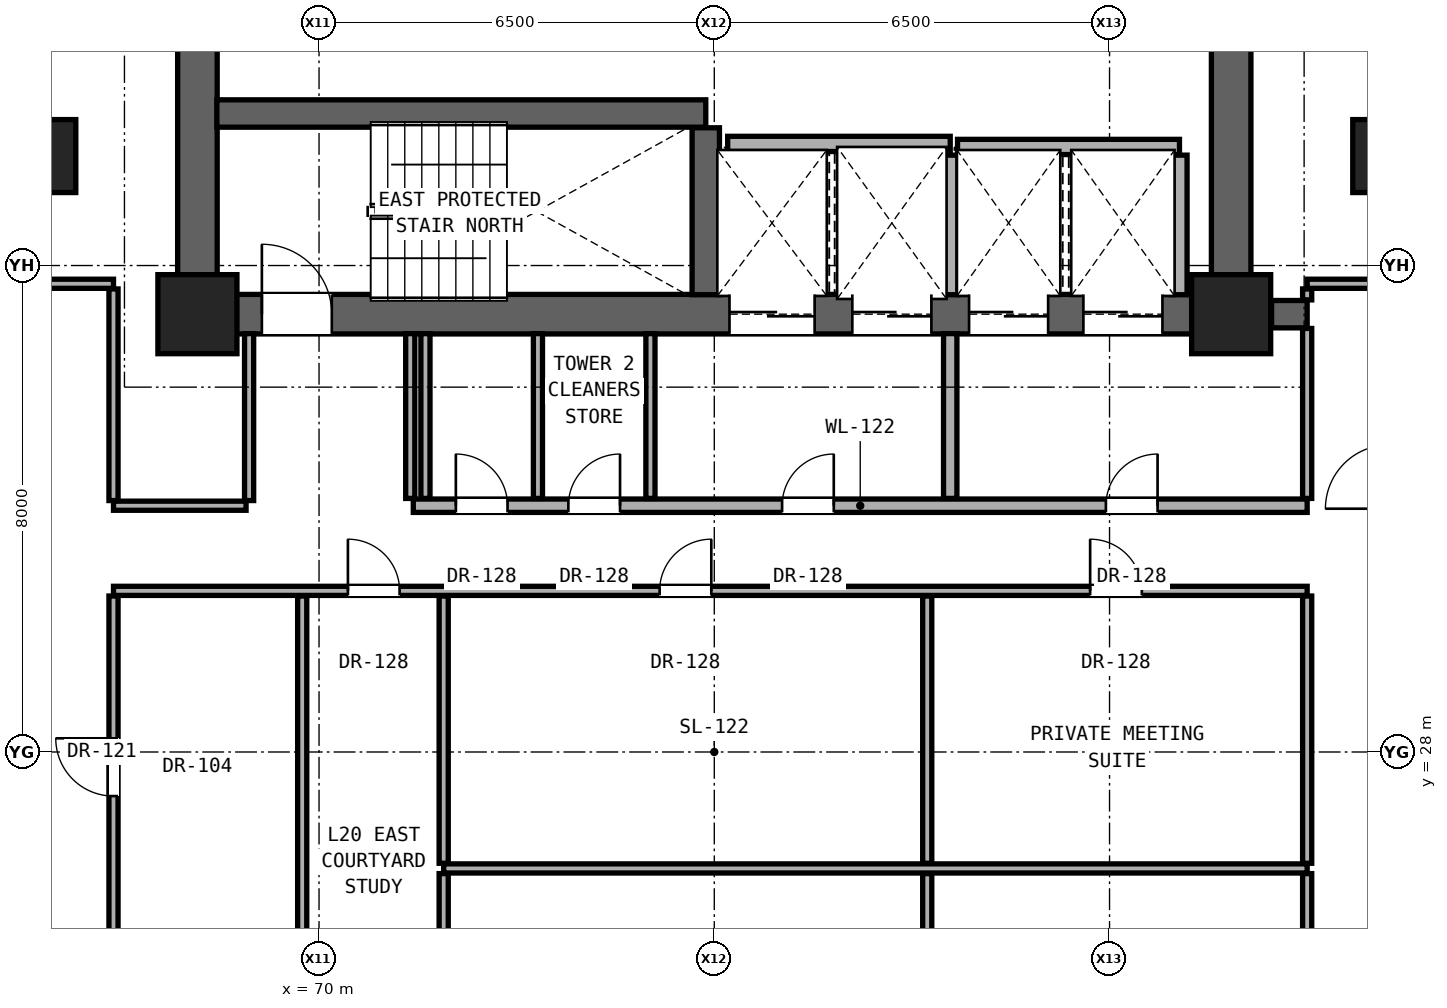
"""IFC4 building model, lengths in metres.
Left out: names, types, materials, properties, quantities, classifications, styles, units other than length and angle.
Written with IfcOpenShell. Run it as: python <this file> out.ifc"""

import sys

from ifc_helpers import new_model, si_unit, direction, frame, frame_2d, origin, origin_2d, place, context, subcontext, project, spatial, rectangle, extrude, element, fill, save


model = new_model("IFC4")
c1 = context("Model", 3, precision=1e-05, world=origin(), true_north=direction((0.0, 1.0)))
c2 = subcontext(c1, "Body", "Model", "MODEL_VIEW")
j1 = project(units=[si_unit("LENGTHUNIT", "METRE"), si_unit("PLANEANGLEUNIT", "RADIAN")], contexts=[c1])
p1 = place(None, origin())
s1 = spatial("IfcSite", under=j1, at=p1, CompositionType="ELEMENT")
p2 = place(p1, origin())
s2 = spatial("IfcBuilding", under=s1, at=p2, CompositionType="ELEMENT")
p3 = place(p2, frame((0.0, 0.0, 71.9)))
s3 = spatial("IfcBuildingStorey", under=s2, at=p3, CompositionType="ELEMENT", Elevation=71.9)
for number, where, z_axis, x_axis in (
    (1, (68.0, 35.2, 0.0), (0.0, 0.0, 1.0), (1.0, 0.0, 0.0)),
    (2, (85.0, 35.2, 0.0), (0.0, 0.0, 1.0), (1.0, 0.0, 0.0)),
):
    element("IfcColumn", number, at=place(p3, frame(where, z_axis=z_axis, x_axis=x_axis)), inside=s3, PredefinedType="COLUMN", context=c2, shape_type="SweptSolid", body=[
        extrude(rectangle(XDim=1.3, YDim=1.3, at=origin_2d()), origin(), (0.0, 0.0, 1.0), 3.3),
    ])
for number, where, z_axis, x_axis in (
    (3, (65.6, 37.8, 0.0), (0.0, 0.0, 1.0), (1.0, 0.0, 0.0)),
    (4, (87.4, 37.8, 0.0), (0.0, 0.0, 1.0), (1.0, 0.0, 0.0)),
):
    element("IfcColumn", number, at=place(p3, frame(where, z_axis=z_axis, x_axis=x_axis)), inside=s3, PredefinedType="PILASTER", context=c2, shape_type="SweptSolid", body=[
        extrude(rectangle(XDim=0.8, YDim=1.2, at=origin_2d()), origin(), (0.0, 0.0, 1.0), 3.3),
    ])
for number, where, z_axis, x_axis in (
    (5, (68.0, 35.2, 0.0), (0.0, 0.0, 1.0), (0.0, 1.0, 0.0)),
    (6, (85.0, 35.2, 0.0), (0.0, 0.0, 1.0), (0.0, 1.0, 0.0)),
):
    element("IfcWall", number, at=place(p3, frame(where, z_axis=z_axis, x_axis=x_axis)), inside=s3, PredefinedType="SHEAR", context=c2, shape_type="SweptSolid", body=[
        extrude(rectangle(XDim=5.6, YDim=0.65, at=frame_2d((2.8, 0.0))), origin(), (0.0, 0.0, 1.0), 3.06),
    ])
p4 = place(p3, frame((68.0, 35.2, 0.0), z_axis=(0.0, 0.0, 1.0), x_axis=(1.0, 0.0, 0.0)))
e7 = element("IfcWall", 7, at=p4, inside=s3, PredefinedType="SHEAR", context=c2, shape_type="SweptSolid", body=[
    extrude(rectangle(XDim=17.0, YDim=0.65, at=frame_2d((8.5, 0.0))), origin(), (0.0, 0.0, 1.0), 3.06),
])
p5 = place(p4, frame((1.06, 0.0, 0.0)))
e8 = element("IfcOpeningElement", 8, at=p5, cuts=e7, PredefinedType="OPENING", context=c2, shape_type="SweptSolid", body=[
    extrude(rectangle(XDim=1.15, YDim=2.2, at=frame_2d((0.575, 1.1))), frame((0.0, 0.335, 0.0), z_axis=(0.0, -1.0, 0.0), x_axis=(1.0, 0.0, 0.0)), (0.0, 0.0, 1.0), 0.67),
])
p6 = place(p4, frame((8.75, 0.0, 0.0)))
e9 = element("IfcOpeningElement", 9, at=p6, cuts=e7, PredefinedType="OPENING", context=c2, shape_type="SweptSolid", body=[
    extrude(rectangle(XDim=1.4, YDim=2.35, at=frame_2d((0.7, 1.175))), frame((0.0, 0.335, 0.0), z_axis=(0.0, -1.0, 0.0), x_axis=(1.0, 0.0, 0.0)), (0.0, 0.0, 1.0), 0.67),
])
p7 = place(p4, frame((10.77, 0.0, 0.0)))
e10 = element("IfcOpeningElement", 10, at=p7, cuts=e7, PredefinedType="OPENING", context=c2, shape_type="SweptSolid", body=[
    extrude(rectangle(XDim=1.3, YDim=2.3, at=frame_2d((0.65, 1.15))), frame((0.0, 0.335, 0.0), z_axis=(0.0, -1.0, 0.0), x_axis=(1.0, 0.0, 0.0)), (0.0, 0.0, 1.0), 0.67),
])
p8 = place(p4, frame((12.69, 0.0, 0.0)))
e11 = element("IfcOpeningElement", 11, at=p8, cuts=e7, PredefinedType="OPENING", context=c2, shape_type="SweptSolid", body=[
    extrude(rectangle(XDim=1.3, YDim=2.3, at=frame_2d((0.65, 1.15))), frame((0.0, 0.335, 0.0), z_axis=(0.0, -1.0, 0.0), x_axis=(1.0, 0.0, 0.0)), (0.0, 0.0, 1.0), 0.67),
])
p9 = place(p4, frame((14.57, 0.0, 0.0)))
e12 = element("IfcOpeningElement", 12, at=p9, cuts=e7, PredefinedType="OPENING", context=c2, shape_type="SweptSolid", body=[
    extrude(rectangle(XDim=1.3, YDim=2.3, at=frame_2d((0.65, 1.15))), frame((0.0, 0.335, 0.0), z_axis=(0.0, -1.0, 0.0), x_axis=(1.0, 0.0, 0.0)), (0.0, 0.0, 1.0), 0.67),
])
p10 = place(p3, frame((72.05, 26.085, 0.0), z_axis=(0.0, 0.0, 1.0), x_axis=(1.0, 0.0, 0.0)))
e13 = element("IfcWall", 13, at=p10, inside=s3, PredefinedType="PARTITIONING", context=c2, shape_type="SweptSolid", body=[
    extrude(rectangle(XDim=14.2, YDim=0.15, at=frame_2d((7.1, 0.0))), origin(), (0.0, 0.0, 1.0), 2.125),
])
p11 = place(p3, frame((66.62, 30.65, 0.0), z_axis=(0.0, 0.0, 1.0), x_axis=(1.0, 0.0, 0.0)))
e14 = element("IfcWall", 14, at=p11, inside=s3, PredefinedType="PARTITIONING", context=c2, shape_type="SweptSolid", body=[
    extrude(rectangle(XDim=19.63, YDim=0.15, at=frame_2d((9.815, 0.0))), origin(), (0.0, 0.0, 1.0), 2.125),
])
p12 = place(p11, frame((3.855, 0.0, 0.0)))
e15 = element("IfcOpeningElement", 15, at=p12, cuts=e14, PredefinedType="OPENING", context=c2, shape_type="SweptSolid", body=[
    extrude(rectangle(XDim=0.85, YDim=2.01, at=frame_2d((0.425, 1.005))), frame((0.0, 0.085, 0.0), z_axis=(0.0, -1.0, 0.0), x_axis=(1.0, 0.0, 0.0)), (0.0, 0.0, 1.0), 0.17),
])
p13 = place(p11, frame((8.981, 0.0, 0.0)))
e16 = element("IfcOpeningElement", 16, at=p13, cuts=e14, PredefinedType="OPENING", context=c2, shape_type="SweptSolid", body=[
    extrude(rectangle(XDim=0.85, YDim=2.01, at=frame_2d((0.425, 1.005))), frame((0.0, 0.085, 0.0), z_axis=(0.0, -1.0, 0.0), x_axis=(1.0, 0.0, 0.0)), (0.0, 0.0, 1.0), 0.17),
])
p14 = place(p11, frame((16.061, 0.0, 0.0)))
e17 = element("IfcOpeningElement", 17, at=p14, cuts=e14, PredefinedType="OPENING", context=c2, shape_type="SweptSolid", body=[
    extrude(rectangle(XDim=0.85, YDim=2.01, at=frame_2d((0.425, 1.005))), frame((0.0, 0.085, 0.0), z_axis=(0.0, -1.0, 0.0), x_axis=(1.0, 0.0, 0.0)), (0.0, 0.0, 1.0), 0.17),
])
p15 = place(p3, frame((66.62, 32.05, 0.0), z_axis=(0.0, 0.0, 1.0), x_axis=(1.0, 0.0, 0.0)))
e18 = element("IfcWall", 18, at=p15, inside=s3, PredefinedType="PARTITIONING", context=c2, shape_type="SweptSolid", body=[
    extrude(rectangle(XDim=2.18, YDim=0.15, at=frame_2d((1.09, 0.0))), origin(), (0.0, 0.0, 1.0), 2.125),
])
p16 = place(p3, frame((71.55, 32.05, 0.0), z_axis=(0.0, 0.0, 1.0), x_axis=(1.0, 0.0, 0.0)))
e19 = element("IfcWall", 19, at=p16, inside=s3, PredefinedType="SOLIDWALL", context=c2, shape_type="SweptSolid", body=[
    extrude(rectangle(XDim=14.7, YDim=0.22, at=frame_2d((7.35, 0.0))), origin(), (0.0, 0.0, 1.0), 2.125),
])
p17 = place(p16, frame((11.39, 0.0, 0.0)))
e20 = element("IfcOpeningElement", 20, at=p17, cuts=e19, PredefinedType="OPENING", context=c2, shape_type="SweptSolid", body=[
    extrude(rectangle(XDim=0.85, YDim=2.01, at=frame_2d((0.425, 1.005))), frame((0.0, 0.12, 0.0), z_axis=(0.0, -1.0, 0.0), x_axis=(1.0, 0.0, 0.0)), (0.0, 0.0, 1.0), 0.24),
])
p18 = place(p16, frame((6.065, 0.0, 0.0)))
e21 = element("IfcOpeningElement", 21, at=p18, cuts=e19, PredefinedType="OPENING", context=c2, shape_type="SweptSolid", body=[
    extrude(rectangle(XDim=0.85, YDim=2.01, at=frame_2d((0.425, 1.005))), frame((0.0, 0.12, 0.0), z_axis=(0.0, -1.0, 0.0), x_axis=(1.0, 0.0, 0.0)), (0.0, 0.0, 1.0), 0.24),
])
p19 = place(p16, frame((0.7, 0.0, 0.0)))
e22 = element("IfcOpeningElement", 22, at=p19, cuts=e19, PredefinedType="OPENING", context=c2, shape_type="SweptSolid", body=[
    extrude(rectangle(XDim=0.85, YDim=2.01, at=frame_2d((0.425, 1.005))), frame((0.0, 0.12, 0.0), z_axis=(0.0, -1.0, 0.0), x_axis=(1.0, 0.0, 0.0)), (0.0, 0.0, 1.0), 0.24),
])
p20 = place(p16, frame((2.55, 0.0, 0.0)))
e23 = element("IfcOpeningElement", 23, at=p20, cuts=e19, PredefinedType="OPENING", context=c2, shape_type="SweptSolid", body=[
    extrude(rectangle(XDim=0.85, YDim=2.01, at=frame_2d((0.425, 1.005))), frame((0.0, 0.12, 0.0), z_axis=(0.0, -1.0, 0.0), x_axis=(1.0, 0.0, 0.0)), (0.0, 0.0, 1.0), 0.24),
])
p21 = place(p3, frame((85.665, 35.2, 0.0), z_axis=(0.0, 0.0, 1.0), x_axis=(1.0, 0.0, 0.0)))
e24 = element("IfcWall", 24, at=p21, inside=s3, PredefinedType="SHEAR", context=c2, shape_type="SweptSolid", body=[
    extrude(rectangle(XDim=0.585, YDim=0.45, at=frame_2d((0.292, 0.0))), origin(), (0.0, 0.0, 1.0), 3.06),
])
p22 = place(p3, frame((65.25, 35.7, 0.0), z_axis=(0.0, 0.0, 1.0), x_axis=(1.0, 0.0, 0.0)))
e25 = element("IfcWall", 25, at=p22, inside=s3, PredefinedType="PARTITIONING", context=c2, shape_type="SweptSolid", body=[
    extrude(rectangle(XDim=1.37, YDim=0.15, at=frame_2d((0.685, 0.0))), origin(), (0.0, 0.0, 1.0), 3.06),
])
p23 = place(p3, frame((86.25, 35.7, 0.0), z_axis=(0.0, 0.0, 1.0), x_axis=(1.0, 0.0, 0.0)))
e26 = element("IfcWall", 26, at=p23, inside=s3, PredefinedType="PARTITIONING", context=c2, shape_type="SweptSolid", body=[
    extrude(rectangle(XDim=1.35, YDim=0.15, at=frame_2d((0.675, 0.0))), origin(), (0.0, 0.0, 1.0), 3.06),
])
p24 = place(p3, frame((80.5, 37.95, 0.0), z_axis=(0.0, 0.0, 1.0), x_axis=(1.0, 0.0, 0.0)))
e27 = element("IfcWall", 27, at=p24, inside=s3, PredefinedType="SOLIDWALL", context=c2, shape_type="SweptSolid", body=[
    extrude(rectangle(XDim=3.65, YDim=0.25, at=frame_2d((1.825, 0.0))), origin(), (0.0, 0.0, 1.0), 3.06),
])
p25 = place(p3, frame((76.72, 38.0, 0.0), z_axis=(0.0, 0.0, 1.0), x_axis=(1.0, 0.0, 0.0)))
e28 = element("IfcWall", 28, at=p25, inside=s3, PredefinedType="SOLIDWALL", context=c2, shape_type="SweptSolid", body=[
    extrude(rectangle(XDim=3.66, YDim=0.25, at=frame_2d((1.83, 0.0))), origin(), (0.0, 0.0, 1.0), 3.06),
])
p26 = place(p3, frame((68.32, 38.5, 0.0), z_axis=(0.0, 0.0, 1.0), x_axis=(1.0, 0.0, 0.0)))
e29 = element("IfcWall", 29, at=p26, inside=s3, PredefinedType="SHEAR", context=c2, shape_type="SweptSolid", body=[
    extrude(rectangle(XDim=8.04, YDim=0.45, at=frame_2d((4.02, 0.0))), origin(), (0.0, 0.0, 1.0), 3.06),
])
p27 = place(p3, frame((66.62, 24.935, 0.0), z_axis=(0.0, 0.0, 1.0), x_axis=(0.0, 1.0, 0.0)))
e30 = element("IfcWall", 30, at=p27, inside=s3, PredefinedType="PARTITIONING", context=c2, shape_type="SweptSolid", body=[
    extrude(rectangle(XDim=5.63, YDim=0.15, at=frame_2d((2.815, 0.0))), origin(), (0.0, 0.0, 1.0), 2.279),
])
p28 = place(p27, frame((2.34, 0.0, 0.0)))
e31 = element("IfcOpeningElement", 31, at=p28, cuts=e30, PredefinedType="OPENING", context=c2, shape_type="SweptSolid", body=[
    extrude(rectangle(XDim=0.95, YDim=2.15, at=frame_2d((0.475, 1.075))), frame((0.0, 0.085, 0.0), z_axis=(0.0, -1.0, 0.0), x_axis=(1.0, 0.0, 0.0)), (0.0, 0.0, 1.0), 0.17),
])
p29 = place(p3, frame((66.62, 32.135, 0.0), z_axis=(0.0, 0.0, 1.0), x_axis=(0.0, 1.0, 0.0)))
e32 = element("IfcWall", 32, at=p29, inside=s3, PredefinedType="PARTITIONING", context=c2, shape_type="SweptSolid", body=[
    extrude(rectangle(XDim=3.48, YDim=0.15, at=frame_2d((1.74, 0.0))), origin(), (0.0, 0.0, 1.0), 2.452),
])
p30 = place(p3, frame((68.85, 32.135, 0.0), z_axis=(0.0, 0.0, 1.0), x_axis=(0.0, 1.0, 0.0)))
e33 = element("IfcWall", 33, at=p30, inside=s3, PredefinedType="PARTITIONING", context=c2, shape_type="SweptSolid", body=[
    extrude(rectangle(XDim=2.745, YDim=0.15, at=frame_2d((1.373, 0.0))), origin(), (0.0, 0.0, 1.0), 3.06),
])
p31 = place(p3, frame((69.723, 24.935, 0.0), z_axis=(0.0, 0.0, 1.0), x_axis=(0.0, 1.0, 0.0)))
e34 = element("IfcWall", 34, at=p31, inside=s3, PredefinedType="PARTITIONING", context=c2, shape_type="SweptSolid", body=[
    extrude(rectangle(XDim=5.63, YDim=0.15, at=frame_2d((2.815, 0.0))), origin(), (0.0, 0.0, 1.0), 2.125),
])
for number, where, z_axis, x_axis in (
    (35, (71.5, 32.17, 0.0), (0.0, 0.0, 1.0), (0.0, 1.0, 0.0)),
    (36, (71.75, 32.17, 0.0), (0.0, 0.0, 1.0), (0.0, 1.0, 0.0)),
):
    element("IfcWall", number, at=place(p3, frame(where, z_axis=z_axis, x_axis=x_axis)), inside=s3, PredefinedType="PARTITIONING", context=c2, shape_type="SweptSolid", body=[
        extrude(rectangle(XDim=2.71, YDim=0.15, at=frame_2d((1.355, 0.0))), origin(), (0.0, 0.0, 1.0), 3.06),
    ])
p32 = place(p3, frame((72.05, 22.435, 0.0), z_axis=(0.0, 0.0, 1.0), x_axis=(0.0, 1.0, 0.0)))
e37 = element("IfcWall", 37, at=p32, inside=s3, PredefinedType="PARTITIONING", context=c2, shape_type="SweptSolid", body=[
    extrude(rectangle(XDim=3.565, YDim=0.15, at=frame_2d((1.782, 0.0))), origin(), (0.0, 0.0, 1.0), 2.589),
])
p33 = place(p3, frame((72.05, 26.17, 0.0), z_axis=(0.0, 0.0, 1.0), x_axis=(0.0, 1.0, 0.0)))
e38 = element("IfcWall", 38, at=p33, inside=s3, PredefinedType="PARTITIONING", context=c2, shape_type="SweptSolid", body=[
    extrude(rectangle(XDim=4.395, YDim=0.15, at=frame_2d((2.198, 0.0))), origin(), (0.0, 0.0, 1.0), 2.125),
])
for number, where, z_axis, x_axis in (
    (39, (73.6, 32.17, 0.0), (0.0, 0.0, 1.0), (0.0, 1.0, 0.0)),
    (40, (75.45, 32.17, 0.0), (0.0, 0.0, 1.0), (0.0, 1.0, 0.0)),
):
    element("IfcWall", number, at=place(p3, frame(where, z_axis=z_axis, x_axis=x_axis)), inside=s3, PredefinedType="PARTITIONING", context=c2, shape_type="SweptSolid", body=[
        extrude(rectangle(XDim=2.71, YDim=0.15, at=frame_2d((1.355, 0.0))), origin(), (0.0, 0.0, 1.0), 3.06),
    ])
p34 = place(p3, frame((76.36, 35.52, 0.0), z_axis=(0.0, 0.0, 1.0), x_axis=(0.0, 1.0, 0.0)))
e41 = element("IfcWall", 41, at=p34, inside=s3, PredefinedType="SHEAR", context=c2, shape_type="SweptSolid", body=[
    extrude(rectangle(XDim=2.745, YDim=0.45, at=frame_2d((1.373, 0.0))), origin(), (0.0, 0.0, 1.0), 3.06),
])
p35 = place(p3, frame((80.002, 22.435, 0.0), z_axis=(0.0, 0.0, 1.0), x_axis=(0.0, 1.0, 0.0)))
e42 = element("IfcWall", 42, at=p35, inside=s3, PredefinedType="PARTITIONING", context=c2, shape_type="SweptSolid", body=[
    extrude(rectangle(XDim=3.565, YDim=0.15, at=frame_2d((1.782, 0.0))), origin(), (0.0, 0.0, 1.0), 3.06),
])
p36 = place(p3, frame((80.002, 26.17, 0.0), z_axis=(0.0, 0.0, 1.0), x_axis=(0.0, 1.0, 0.0)))
e43 = element("IfcWall", 43, at=p36, inside=s3, PredefinedType="PARTITIONING", context=c2, shape_type="SweptSolid", body=[
    extrude(rectangle(XDim=4.395, YDim=0.15, at=frame_2d((2.198, 0.0))), origin(), (0.0, 0.0, 1.0), 2.125),
])
p37 = place(p3, frame((80.38, 32.17, 0.0), z_axis=(0.0, 0.0, 1.0), x_axis=(0.0, 1.0, 0.0)))
e44 = element("IfcWall", 44, at=p37, inside=s3, PredefinedType="SOLIDWALL", context=c2, shape_type="SweptSolid", body=[
    extrude(rectangle(XDim=2.71, YDim=0.22, at=frame_2d((1.355, 0.0))), origin(), (0.0, 0.0, 1.0), 3.06),
])
for number, where, z_axis, x_axis in (
    (45, (80.38, 35.52, 0.0), (0.0, 0.0, 1.0), (0.0, 1.0, 0.0)),
    (46, (84.15, 35.52, 0.0), (0.0, 0.0, 1.0), (0.0, 1.0, 0.0)),
):
    element("IfcWall", number, at=place(p3, frame(where, z_axis=z_axis, x_axis=x_axis)), inside=s3, PredefinedType="SOLIDWALL", context=c2, shape_type="SweptSolid", body=[
        extrude(rectangle(XDim=2.295, YDim=0.25, at=frame_2d((1.147, 0.0))), origin(), (0.0, 0.0, 1.0), 3.06),
    ])
p38 = place(p3, frame((86.25, 22.435, 0.0), z_axis=(0.0, 0.0, 1.0), x_axis=(0.0, 1.0, 0.0)))
e47 = element("IfcWall", 47, at=p38, inside=s3, PredefinedType="PARTITIONING", context=c2, shape_type="SweptSolid", body=[
    extrude(rectangle(XDim=3.565, YDim=0.15, at=frame_2d((1.782, 0.0))), origin(), (0.0, 0.0, 1.0), 3.06),
])
p39 = place(p3, frame((86.25, 26.17, 0.0), z_axis=(0.0, 0.0, 1.0), x_axis=(0.0, 1.0, 0.0)))
e48 = element("IfcWall", 48, at=p39, inside=s3, PredefinedType="PARTITIONING", context=c2, shape_type="SweptSolid", body=[
    extrude(rectangle(XDim=4.395, YDim=0.15, at=frame_2d((2.198, 0.0))), origin(), (0.0, 0.0, 1.0), 2.279),
])
p40 = place(p3, frame((86.25, 32.17, 0.0), z_axis=(0.0, 0.0, 1.0), x_axis=(0.0, 1.0, 0.0)))
e49 = element("IfcWall", 49, at=p40, inside=s3, PredefinedType="PARTITIONING", context=c2, shape_type="SweptSolid", body=[
    extrude(rectangle(XDim=2.795, YDim=0.15, at=frame_2d((1.397, 0.0))), origin(), (0.0, 0.0, 1.0), 2.452),
])
p41 = place(p3, frame((86.25, 35.435, 0.0), z_axis=(0.0, 0.0, 1.0), x_axis=(0.0, 1.0, 0.0)))
e50 = element("IfcWall", 50, at=p41, inside=s3, PredefinedType="PARTITIONING", context=c2, shape_type="SweptSolid", body=[
    extrude(rectangle(XDim=0.18, YDim=0.15, at=frame_2d((0.09, 0.0))), origin(), (0.0, 0.0, 1.0), 2.452),
])
p42 = place(p17, origin())
e51 = element("IfcDoor", 51, at=p42, inside=s3, OperationType="SINGLE_SWING_RIGHT", PredefinedType="DOOR", context=c2, shape_type="SweptSolid", body=[
    extrude(rectangle(XDim=0.85, YDim=2.01, at=frame_2d((0.425, 1.005))), frame((0.0, 0.025, 0.0), z_axis=(0.0, -1.0, 0.0), x_axis=(1.0, 0.0, 0.0)), (0.0, 0.0, 1.0), 0.05),
])
fill(e20, e51)
p43 = place(p5, origin())
e52 = element("IfcDoor", 52, at=p43, inside=s3, OperationType="SINGLE_SWING_LEFT", PredefinedType="DOOR", context=c2, shape_type="SweptSolid", body=[
    extrude(rectangle(XDim=1.15, YDim=2.2, at=frame_2d((0.575, 1.1))), frame((0.0, 0.025, 0.0), z_axis=(0.0, -1.0, 0.0), x_axis=(1.0, 0.0, 0.0)), (0.0, 0.0, 1.0), 0.05),
])
fill(e8, e52)
p44 = place(p18, origin())
e53 = element("IfcDoor", 53, at=p44, inside=s3, OperationType="SINGLE_SWING_RIGHT", PredefinedType="DOOR", context=c2, shape_type="SweptSolid", body=[
    extrude(rectangle(XDim=0.85, YDim=2.01, at=frame_2d((0.425, 1.005))), frame((0.0, 0.025, 0.0), z_axis=(0.0, -1.0, 0.0), x_axis=(1.0, 0.0, 0.0)), (0.0, 0.0, 1.0), 0.05),
])
fill(e21, e53)
p45 = place(p19, origin())
e54 = element("IfcDoor", 54, at=p45, inside=s3, OperationType="SINGLE_SWING_LEFT", PredefinedType="DOOR", context=c2, shape_type="SweptSolid", body=[
    extrude(rectangle(XDim=0.85, YDim=2.01, at=frame_2d((0.425, 1.005))), frame((0.0, 0.025, 0.0), z_axis=(0.0, -1.0, 0.0), x_axis=(1.0, 0.0, 0.0)), (0.0, 0.0, 1.0), 0.05),
])
fill(e22, e54)
p46 = place(p20, origin())
e55 = element("IfcDoor", 55, at=p46, inside=s3, OperationType="SINGLE_SWING_RIGHT", PredefinedType="DOOR", context=c2, shape_type="SweptSolid", body=[
    extrude(rectangle(XDim=0.85, YDim=2.01, at=frame_2d((0.425, 1.005))), frame((0.0, 0.025, 0.0), z_axis=(0.0, -1.0, 0.0), x_axis=(1.0, 0.0, 0.0)), (0.0, 0.0, 1.0), 0.05),
])
fill(e23, e55)
p47 = place(p28, origin())
e56 = element("IfcDoor", 56, at=p47, inside=s3, OperationType="SINGLE_SWING_RIGHT", PredefinedType="DOOR", context=c2, shape_type="SweptSolid", body=[
    extrude(rectangle(XDim=0.95, YDim=2.15, at=frame_2d((0.475, 1.075))), frame((0.0, 0.025, 0.0), z_axis=(0.0, -1.0, 0.0), x_axis=(1.0, 0.0, 0.0)), (0.0, 0.0, 1.0), 0.05),
])
fill(e31, e56)
p48 = place(p12, origin())
e57 = element("IfcDoor", 57, at=p48, inside=s3, OperationType="SINGLE_SWING_LEFT", PredefinedType="DOOR", context=c2, shape_type="SweptSolid", body=[
    extrude(rectangle(XDim=0.85, YDim=2.01, at=frame_2d((0.425, 1.005))), frame((0.0, 0.025, 0.0), z_axis=(0.0, -1.0, 0.0), x_axis=(1.0, 0.0, 0.0)), (0.0, 0.0, 1.0), 0.05),
])
fill(e15, e57)
p49 = place(p13, origin())
e58 = element("IfcDoor", 58, at=p49, inside=s3, OperationType="SINGLE_SWING_RIGHT", PredefinedType="DOOR", context=c2, shape_type="SweptSolid", body=[
    extrude(rectangle(XDim=0.85, YDim=2.01, at=frame_2d((0.425, 1.005))), frame((0.0, 0.025, 0.0), z_axis=(0.0, -1.0, 0.0), x_axis=(1.0, 0.0, 0.0)), (0.0, 0.0, 1.0), 0.05),
])
fill(e16, e58)
p50 = place(p14, origin())
e59 = element("IfcDoor", 59, at=p50, inside=s3, OperationType="SINGLE_SWING_LEFT", PredefinedType="DOOR", context=c2, shape_type="SweptSolid", body=[
    extrude(rectangle(XDim=0.85, YDim=2.01, at=frame_2d((0.425, 1.005))), frame((0.0, 0.025, 0.0), z_axis=(0.0, -1.0, 0.0), x_axis=(1.0, 0.0, 0.0)), (0.0, 0.0, 1.0), 0.05),
])
fill(e17, e59)
p51 = place(p6, origin())
e60 = element("IfcDoor", 60, at=p51, inside=s3, OperationType="DOUBLE_DOOR_SLIDING", PredefinedType="DOOR", context=c2, shape_type="SweptSolid", body=[
    extrude(rectangle(XDim=1.4, YDim=2.35, at=frame_2d((0.7, 1.175))), frame((0.0, 0.025, 0.0), z_axis=(0.0, -1.0, 0.0), x_axis=(1.0, 0.0, 0.0)), (0.0, 0.0, 1.0), 0.05),
])
fill(e9, e60)
p52 = place(p7, origin())
e61 = element("IfcDoor", 61, at=p52, inside=s3, OperationType="DOUBLE_DOOR_SLIDING", PredefinedType="DOOR", context=c2, shape_type="SweptSolid", body=[
    extrude(rectangle(XDim=1.3, YDim=2.3, at=frame_2d((0.65, 1.15))), frame((0.0, 0.025, 0.0), z_axis=(0.0, -1.0, 0.0), x_axis=(1.0, 0.0, 0.0)), (0.0, 0.0, 1.0), 0.05),
])
fill(e10, e61)
p53 = place(p8, origin())
e62 = element("IfcDoor", 62, at=p53, inside=s3, OperationType="DOUBLE_DOOR_SLIDING", PredefinedType="DOOR", context=c2, shape_type="SweptSolid", body=[
    extrude(rectangle(XDim=1.3, YDim=2.3, at=frame_2d((0.65, 1.15))), frame((0.0, 0.025, 0.0), z_axis=(0.0, -1.0, 0.0), x_axis=(1.0, 0.0, 0.0)), (0.0, 0.0, 1.0), 0.05),
])
fill(e11, e62)
p54 = place(p9, origin())
e63 = element("IfcDoor", 63, at=p54, inside=s3, OperationType="DOUBLE_DOOR_SLIDING", PredefinedType="DOOR", context=c2, shape_type="SweptSolid", body=[
    extrude(rectangle(XDim=1.3, YDim=2.3, at=frame_2d((0.65, 1.15))), frame((0.0, 0.025, 0.0), z_axis=(0.0, -1.0, 0.0), x_axis=(1.0, 0.0, 0.0)), (0.0, 0.0, 1.0), 0.05),
])
fill(e12, e63)
save(model, sys.argv[1])
